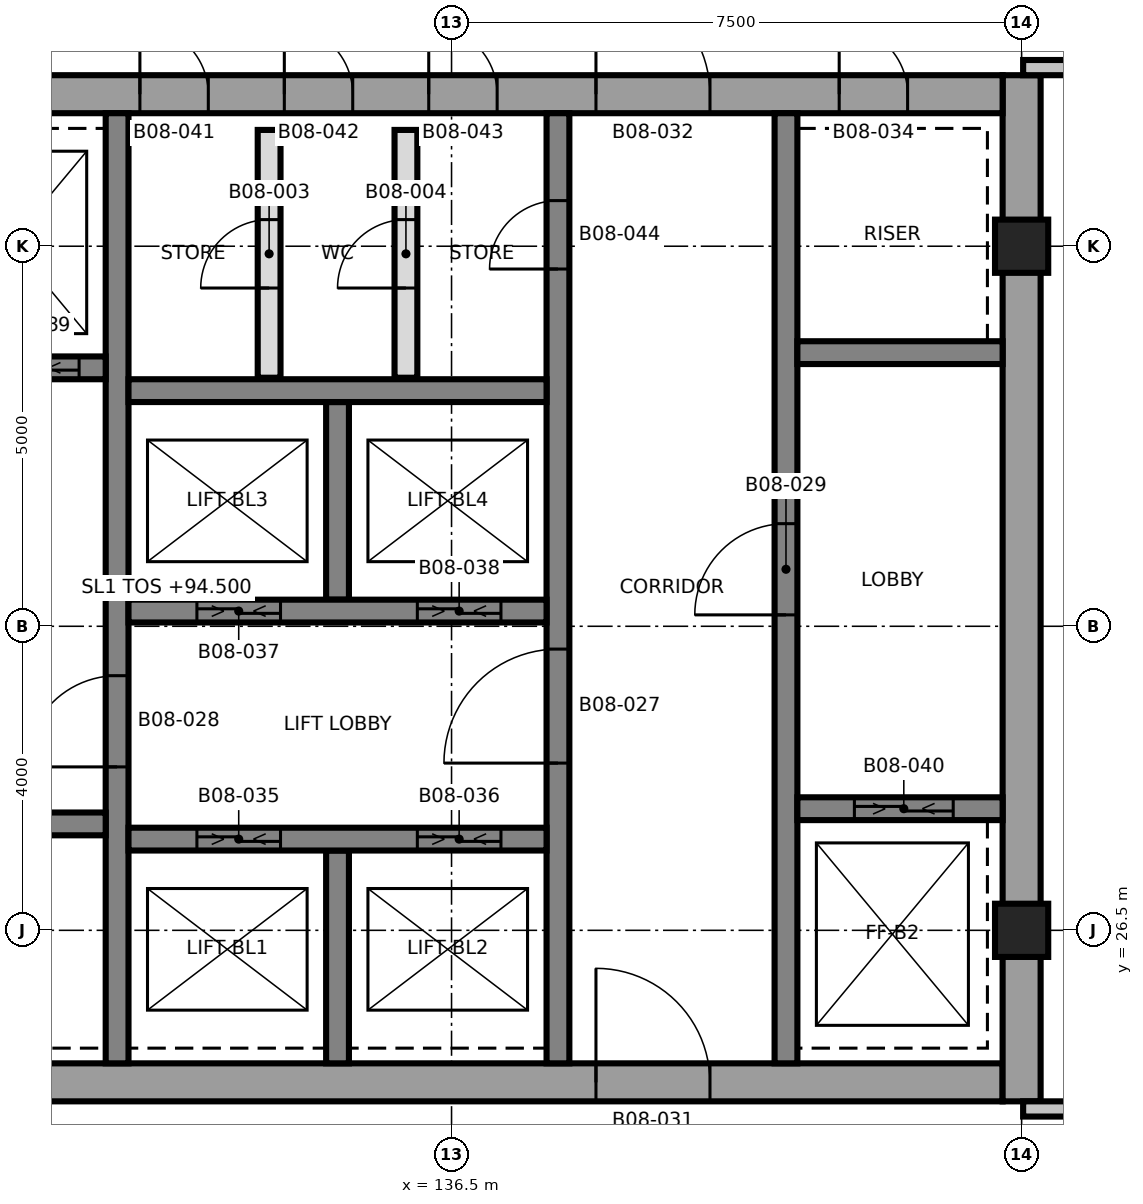
"""IFC4 building model, lengths in metres.
Left out: names, types, materials, properties, quantities, classifications, styles, units other than length and angle.
Written with IfcOpenShell. Run it as: python <this file> out.ifc"""

import sys

from ifc_helpers import new_model, si_unit, direction, frame, frame_2d, origin, origin_2d, place, context, subcontext, project, spatial, rectangle, extrude, element, fill, save


model = new_model("IFC4")
c1 = context("Model", 3, precision=1e-05, world=origin(), true_north=direction((0.0, 1.0)))
c2 = subcontext(c1, "Body", "Model", "MODEL_VIEW")
j1 = project(units=[si_unit("LENGTHUNIT", "METRE"), si_unit("PLANEANGLEUNIT", "RADIAN")], contexts=[c1])
p1 = place(None, origin())
s1 = spatial("IfcSite", under=j1, at=p1, CompositionType="ELEMENT")
p2 = place(p1, origin())
s2 = spatial("IfcBuilding", under=s1, at=p2, CompositionType="ELEMENT")
p3 = place(p2, frame((0.0, 0.0, 94.5)))
s3 = spatial("IfcBuildingStorey", under=s2, at=p3, CompositionType="ELEMENT", Elevation=94.5)
p4 = place(p3, frame((128.75, 24.5, 0.0), z_axis=(0.0, 0.0, 1.0), x_axis=(1.0, 0.0, 0.0)))
e1 = element("IfcWall", 1, at=p4, inside=s3, PredefinedType="SHEAR", context=c2, shape_type="SweptSolid", body=[
    extrude(rectangle(XDim=15.0, YDim=0.5, at=frame_2d((7.5, 0.0))), origin(), (0.0, 0.0, 1.0), 3.7),
])
p5 = place(p4, frame((9.65, 0.0, 0.0)))
e2 = element("IfcOpeningElement", 2, at=p5, cuts=e1, PredefinedType="OPENING", context=c2, shape_type="SweptSolid", body=[
    extrude(rectangle(XDim=1.5, YDim=2.1, at=frame_2d((0.75, 1.05))), frame((0.0, 0.26, 0.0), z_axis=(0.0, -1.0, 0.0), x_axis=(1.0, 0.0, 0.0)), (0.0, 0.0, 1.0), 0.52),
])
p6 = place(p4, frame((1.25, 0.0, 0.0)))
e3 = element("IfcOpeningElement", 3, at=p6, cuts=e1, PredefinedType="OPENING", context=c2, shape_type="SweptSolid", body=[
    extrude(rectangle(XDim=0.9, YDim=2.1, at=frame_2d((0.45, 1.05))), frame((0.0, 0.26, 0.0), z_axis=(0.0, -1.0, 0.0), x_axis=(1.0, 0.0, 0.0)), (0.0, 0.0, 1.0), 0.52),
])
p7 = place(p3, frame((144.0, 24.25, 0.0), z_axis=(0.0, 0.0, 1.0), x_axis=(0.0, 1.0, 0.0)))
e4 = element("IfcWall", 4, at=p7, inside=s3, PredefinedType="SHEAR", context=c2, shape_type="SweptSolid", body=[
    extrude(rectangle(XDim=13.5, YDim=0.5, at=frame_2d((6.75, 0.0))), origin(), (0.0, 0.0, 1.0), 3.7),
])
p8 = place(p3, frame((128.75, 37.5, 0.0), z_axis=(0.0, 0.0, 1.0), x_axis=(1.0, 0.0, 0.0)))
e5 = element("IfcWall", 5, at=p8, inside=s3, PredefinedType="SHEAR", context=c2, shape_type="SweptSolid", body=[
    extrude(rectangle(XDim=15.0, YDim=0.5, at=frame_2d((7.5, 0.0))), origin(), (0.0, 0.0, 1.0), 3.7),
])
p9 = place(p8, frame((9.65, 0.0, 0.0)))
e6 = element("IfcOpeningElement", 6, at=p9, cuts=e5, PredefinedType="OPENING", context=c2, shape_type="SweptSolid", body=[
    extrude(rectangle(XDim=1.5, YDim=2.1, at=frame_2d((0.75, 1.05))), frame((0.0, 0.26, 0.0), z_axis=(0.0, -1.0, 0.0), x_axis=(1.0, 0.0, 0.0)), (0.0, 0.0, 1.0), 0.52),
])
p10 = place(p8, frame((12.85, 0.0, 0.0)))
e7 = element("IfcOpeningElement", 7, at=p10, cuts=e5, PredefinedType="OPENING", context=c2, shape_type="SweptSolid", body=[
    extrude(rectangle(XDim=0.9, YDim=2.1, at=frame_2d((0.45, 1.05))), frame((0.0, 0.26, 0.0), z_axis=(0.0, -1.0, 0.0), x_axis=(1.0, 0.0, 0.0)), (0.0, 0.0, 1.0), 0.52),
])
p11 = place(p8, frame((3.65, 0.0, 0.0)))
e8 = element("IfcOpeningElement", 8, at=p11, cuts=e5, PredefinedType="OPENING", context=c2, shape_type="SweptSolid", body=[
    extrude(rectangle(XDim=0.9, YDim=2.1, at=frame_2d((0.45, 1.05))), frame((0.0, 0.26, 0.0), z_axis=(0.0, -1.0, 0.0), x_axis=(1.0, 0.0, 0.0)), (0.0, 0.0, 1.0), 0.52),
])
p12 = place(p8, frame((5.55, 0.0, 0.0)))
e9 = element("IfcOpeningElement", 9, at=p12, cuts=e5, PredefinedType="OPENING", context=c2, shape_type="SweptSolid", body=[
    extrude(rectangle(XDim=0.9, YDim=2.1, at=frame_2d((0.45, 1.05))), frame((0.0, 0.26, 0.0), z_axis=(0.0, -1.0, 0.0), x_axis=(1.0, 0.0, 0.0)), (0.0, 0.0, 1.0), 0.52),
])
p13 = place(p8, frame((7.45, 0.0, 0.0)))
e10 = element("IfcOpeningElement", 10, at=p13, cuts=e5, PredefinedType="OPENING", context=c2, shape_type="SweptSolid", body=[
    extrude(rectangle(XDim=0.9, YDim=2.1, at=frame_2d((0.45, 1.05))), frame((0.0, 0.26, 0.0), z_axis=(0.0, -1.0, 0.0), x_axis=(1.0, 0.0, 0.0)), (0.0, 0.0, 1.0), 0.52),
])
p14 = place(p3, frame((132.1, 24.75, 0.0), z_axis=(0.0, 0.0, 1.0), x_axis=(0.0, 1.0, 0.0)))
e11 = element("IfcWall", 11, at=p14, inside=s3, PredefinedType="SHEAR", context=c2, shape_type="SweptSolid", body=[
    extrude(rectangle(XDim=12.5, YDim=0.3, at=frame_2d((6.25, 0.0))), origin(), (0.0, 0.0, 1.0), 3.7),
])
p15 = place(p14, frame((3.9, 0.0, 0.0)))
e12 = element("IfcOpeningElement", 12, at=p15, cuts=e11, PredefinedType="OPENING", context=c2, shape_type="SweptSolid", body=[
    extrude(rectangle(XDim=1.2, YDim=2.1, at=frame_2d((0.6, 1.05))), frame((0.0, 0.16, 0.0), z_axis=(0.0, -1.0, 0.0), x_axis=(1.0, 0.0, 0.0)), (0.0, 0.0, 1.0), 0.32),
])
p16 = place(p3, frame((137.9, 24.75, 0.0), z_axis=(0.0, 0.0, 1.0), x_axis=(0.0, 1.0, 0.0)))
e13 = element("IfcWall", 13, at=p16, inside=s3, PredefinedType="SHEAR", context=c2, shape_type="SweptSolid", body=[
    extrude(rectangle(XDim=12.5, YDim=0.3, at=frame_2d((6.25, 0.0))), origin(), (0.0, 0.0, 1.0), 3.7),
])
p17 = place(p16, frame((3.95, 0.0, 0.0)))
e14 = element("IfcOpeningElement", 14, at=p17, cuts=e13, PredefinedType="OPENING", context=c2, shape_type="SweptSolid", body=[
    extrude(rectangle(XDim=1.5, YDim=2.1, at=frame_2d((0.75, 1.05))), frame((0.0, 0.16, 0.0), z_axis=(0.0, -1.0, 0.0), x_axis=(1.0, 0.0, 0.0)), (0.0, 0.0, 1.0), 0.32),
])
p18 = place(p16, frame((10.45, 0.0, 0.0)))
e15 = element("IfcOpeningElement", 15, at=p18, cuts=e13, PredefinedType="OPENING", context=c2, shape_type="SweptSolid", body=[
    extrude(rectangle(XDim=0.9, YDim=2.1, at=frame_2d((0.45, 1.05))), frame((0.0, 0.16, 0.0), z_axis=(0.0, -1.0, 0.0), x_axis=(1.0, 0.0, 0.0)), (0.0, 0.0, 1.0), 0.32),
])
p19 = place(p3, frame((140.9, 24.75, 0.0), z_axis=(0.0, 0.0, 1.0), x_axis=(0.0, 1.0, 0.0)))
e16 = element("IfcWall", 16, at=p19, inside=s3, PredefinedType="SHEAR", context=c2, shape_type="SweptSolid", body=[
    extrude(rectangle(XDim=12.5, YDim=0.3, at=frame_2d((6.25, 0.0))), origin(), (0.0, 0.0, 1.0), 3.7),
])
p20 = place(p19, frame((5.9, 0.0, 0.0)))
e17 = element("IfcOpeningElement", 17, at=p20, cuts=e16, PredefinedType="OPENING", context=c2, shape_type="SweptSolid", body=[
    extrude(rectangle(XDim=1.2, YDim=2.1, at=frame_2d((0.6, 1.05))), frame((0.0, 0.16, 0.0), z_axis=(0.0, -1.0, 0.0), x_axis=(1.0, 0.0, 0.0)), (0.0, 0.0, 1.0), 0.32),
])
p21 = place(p3, frame((135.0, 24.75, 0.0), z_axis=(0.0, 0.0, 1.0), x_axis=(0.0, 1.0, 0.0)))
e18 = element("IfcWall", 18, at=p21, inside=s3, PredefinedType="SHEAR", context=c2, shape_type="SweptSolid", body=[
    extrude(rectangle(XDim=2.8, YDim=0.3, at=frame_2d((1.4, 0.0))), origin(), (0.0, 0.0, 1.0), 3.7),
])
p22 = place(p3, frame((135.0, 30.85, 0.0), z_axis=(0.0, 0.0, 1.0), x_axis=(0.0, 1.0, 0.0)))
e19 = element("IfcWall", 19, at=p22, inside=s3, PredefinedType="SHEAR", context=c2, shape_type="SweptSolid", body=[
    extrude(rectangle(XDim=2.6, YDim=0.3, at=frame_2d((1.3, 0.0))), origin(), (0.0, 0.0, 1.0), 3.7),
])
p23 = place(p3, frame((132.25, 27.7, 0.0), z_axis=(0.0, 0.0, 1.0), x_axis=(1.0, 0.0, 0.0)))
e20 = element("IfcWall", 20, at=p23, inside=s3, PredefinedType="SHEAR", context=c2, shape_type="SweptSolid", body=[
    extrude(rectangle(XDim=5.5, YDim=0.3, at=frame_2d((2.75, 0.0))), origin(), (0.0, 0.0, 1.0), 3.7),
])
p24 = place(p23, frame((0.9, 0.0, 0.0)))
e21 = element("IfcOpeningElement", 21, at=p24, cuts=e20, PredefinedType="OPENING", context=c2, shape_type="SweptSolid", body=[
    extrude(rectangle(XDim=1.1, YDim=2.4, at=frame_2d((0.55, 1.2))), frame((0.0, 0.16, 0.0), z_axis=(0.0, -1.0, 0.0), x_axis=(1.0, 0.0, 0.0)), (0.0, 0.0, 1.0), 0.32),
])
p25 = place(p23, frame((3.8, 0.0, 0.0)))
e22 = element("IfcOpeningElement", 22, at=p25, cuts=e20, PredefinedType="OPENING", context=c2, shape_type="SweptSolid", body=[
    extrude(rectangle(XDim=1.1, YDim=2.4, at=frame_2d((0.55, 1.2))), frame((0.0, 0.16, 0.0), z_axis=(0.0, -1.0, 0.0), x_axis=(1.0, 0.0, 0.0)), (0.0, 0.0, 1.0), 0.32),
])
p26 = place(p3, frame((132.25, 30.7, 0.0), z_axis=(0.0, 0.0, 1.0), x_axis=(1.0, 0.0, 0.0)))
e23 = element("IfcWall", 23, at=p26, inside=s3, PredefinedType="SHEAR", context=c2, shape_type="SweptSolid", body=[
    extrude(rectangle(XDim=5.5, YDim=0.3, at=frame_2d((2.75, 0.0))), origin(), (0.0, 0.0, 1.0), 3.7),
])
p27 = place(p26, frame((0.9, 0.0, 0.0)))
e24 = element("IfcOpeningElement", 24, at=p27, cuts=e23, PredefinedType="OPENING", context=c2, shape_type="SweptSolid", body=[
    extrude(rectangle(XDim=1.1, YDim=2.4, at=frame_2d((0.55, 1.2))), frame((0.0, 0.16, 0.0), z_axis=(0.0, -1.0, 0.0), x_axis=(1.0, 0.0, 0.0)), (0.0, 0.0, 1.0), 0.32),
])
p28 = place(p26, frame((3.8, 0.0, 0.0)))
e25 = element("IfcOpeningElement", 25, at=p28, cuts=e23, PredefinedType="OPENING", context=c2, shape_type="SweptSolid", body=[
    extrude(rectangle(XDim=1.1, YDim=2.4, at=frame_2d((0.55, 1.2))), frame((0.0, 0.16, 0.0), z_axis=(0.0, -1.0, 0.0), x_axis=(1.0, 0.0, 0.0)), (0.0, 0.0, 1.0), 0.32),
])
p29 = place(p3, frame((132.25, 33.6, 0.0), z_axis=(0.0, 0.0, 1.0), x_axis=(1.0, 0.0, 0.0)))
e26 = element("IfcWall", 26, at=p29, inside=s3, PredefinedType="SHEAR", context=c2, shape_type="SweptSolid", body=[
    extrude(rectangle(XDim=5.5, YDim=0.3, at=frame_2d((2.75, 0.0))), origin(), (0.0, 0.0, 1.0), 3.7),
])
p30 = place(p3, frame((129.25, 27.9, 0.0), z_axis=(0.0, 0.0, 1.0), x_axis=(1.0, 0.0, 0.0)))
e27 = element("IfcWall", 27, at=p30, inside=s3, PredefinedType="SHEAR", context=c2, shape_type="SweptSolid", body=[
    extrude(rectangle(XDim=2.7, YDim=0.3, at=frame_2d((1.35, 0.0))), origin(), (0.0, 0.0, 1.0), 3.7),
])
p31 = place(p3, frame((129.25, 33.9, 0.0), z_axis=(0.0, 0.0, 1.0), x_axis=(1.0, 0.0, 0.0)))
e28 = element("IfcWall", 28, at=p31, inside=s3, PredefinedType="SHEAR", context=c2, shape_type="SweptSolid", body=[
    extrude(rectangle(XDim=2.7, YDim=0.3, at=frame_2d((1.35, 0.0))), origin(), (0.0, 0.0, 1.0), 3.7),
])
p32 = place(p31, frame((1.05, 0.0, 0.0)))
e29 = element("IfcOpeningElement", 29, at=p32, cuts=e28, PredefinedType="OPENING", context=c2, shape_type="SweptSolid", body=[
    extrude(rectangle(XDim=1.3, YDim=2.4, at=frame_2d((0.65, 1.2))), frame((0.0, 0.16, 0.0), z_axis=(0.0, -1.0, 0.0), x_axis=(1.0, 0.0, 0.0)), (0.0, 0.0, 1.0), 0.32),
])
p33 = place(p3, frame((141.05, 28.1, 0.0), z_axis=(0.0, 0.0, 1.0), x_axis=(1.0, 0.0, 0.0)))
e30 = element("IfcWall", 30, at=p33, inside=s3, PredefinedType="SHEAR", context=c2, shape_type="SweptSolid", body=[
    extrude(rectangle(XDim=2.7, YDim=0.3, at=frame_2d((1.35, 0.0))), origin(), (0.0, 0.0, 1.0), 3.7),
])
p34 = place(p33, frame((0.75, 0.0, 0.0)))
e31 = element("IfcOpeningElement", 31, at=p34, cuts=e30, PredefinedType="OPENING", context=c2, shape_type="SweptSolid", body=[
    extrude(rectangle(XDim=1.3, YDim=2.4, at=frame_2d((0.65, 1.2))), frame((0.0, 0.16, 0.0), z_axis=(0.0, -1.0, 0.0), x_axis=(1.0, 0.0, 0.0)), (0.0, 0.0, 1.0), 0.32),
])
p35 = place(p3, frame((141.05, 34.1, 0.0), z_axis=(0.0, 0.0, 1.0), x_axis=(1.0, 0.0, 0.0)))
e32 = element("IfcWall", 32, at=p35, inside=s3, PredefinedType="SHEAR", context=c2, shape_type="SweptSolid", body=[
    extrude(rectangle(XDim=2.7, YDim=0.3, at=frame_2d((1.35, 0.0))), origin(), (0.0, 0.0, 1.0), 3.7),
])
for number, where, z_axis, x_axis in (
    (33, (144.0, 26.5, 0.0), (0.0, 0.0, 1.0), (1.0, 0.0, 0.0)),
    (34, (144.0, 35.5, 0.0), (0.0, 0.0, 1.0), (1.0, 0.0, 0.0)),
):
    element("IfcColumn", number, at=place(p3, frame(where, z_axis=z_axis, x_axis=x_axis)), inside=s3, PredefinedType="COLUMN", context=c2, shape_type="SweptSolid", body=[
        extrude(rectangle(XDim=0.7, YDim=0.7, at=origin_2d()), origin(), (0.0, 0.0, 1.0), 3.7),
    ])
for number, where, z_axis, x_axis in (
    (35, (144.02, 24.15, 0.0), (0.0, 0.0, 1.0), (1.0, 0.0, 0.0)),
    (36, (144.02, 37.85, 0.0), (0.0, 0.0, 1.0), (1.0, 0.0, 0.0)),
):
    element("IfcWall", number, at=place(p3, frame(where, z_axis=z_axis, x_axis=x_axis)), inside=s3, PredefinedType="PARTITIONING", context=c2, shape_type="SweptSolid", body=[
        extrude(rectangle(XDim=0.92, YDim=0.2, at=frame_2d((0.46, 0.0))), origin(), (0.0, 0.0, 1.0), 3.4),
    ])
p36 = place(p3, frame((134.1, 33.77, 0.0), z_axis=(0.0, 0.0, 1.0), x_axis=(0.0, 1.0, 0.0)))
e37 = element("IfcWall", 37, at=p36, inside=s3, PredefinedType="PARTITIONING", context=c2, shape_type="SweptSolid", body=[
    extrude(rectangle(XDim=3.26, YDim=0.3, at=frame_2d((1.63, 0.0))), origin(), (0.0, 0.0, 1.0), 3.4),
])
p37 = place(p36, frame((1.18, 0.0, 0.0)))
e38 = element("IfcOpeningElement", 38, at=p37, cuts=e37, PredefinedType="OPENING", context=c2, shape_type="SweptSolid", body=[
    extrude(rectangle(XDim=0.9, YDim=2.1, at=frame_2d((0.45, 1.05))), frame((0.0, 0.16, 0.0), z_axis=(0.0, -1.0, 0.0), x_axis=(1.0, 0.0, 0.0)), (0.0, 0.0, 1.0), 0.32),
])
p38 = place(p3, frame((135.9, 33.77, 0.0), z_axis=(0.0, 0.0, 1.0), x_axis=(0.0, 1.0, 0.0)))
e39 = element("IfcWall", 39, at=p38, inside=s3, PredefinedType="PARTITIONING", context=c2, shape_type="SweptSolid", body=[
    extrude(rectangle(XDim=3.26, YDim=0.3, at=frame_2d((1.63, 0.0))), origin(), (0.0, 0.0, 1.0), 3.4),
])
p39 = place(p38, frame((1.18, 0.0, 0.0)))
e40 = element("IfcOpeningElement", 40, at=p39, cuts=e39, PredefinedType="OPENING", context=c2, shape_type="SweptSolid", body=[
    extrude(rectangle(XDim=0.9, YDim=2.1, at=frame_2d((0.45, 1.05))), frame((0.0, 0.16, 0.0), z_axis=(0.0, -1.0, 0.0), x_axis=(1.0, 0.0, 0.0)), (0.0, 0.0, 1.0), 0.32),
])
p40 = place(p37, origin())
e41 = element("IfcDoor", 41, at=p40, inside=s3, OperationType="SINGLE_SWING_LEFT", PredefinedType="DOOR", context=c2, shape_type="SweptSolid", body=[
    extrude(rectangle(XDim=0.9, YDim=2.1, at=frame_2d((0.45, 1.05))), frame((0.0, 0.025, 0.0), z_axis=(0.0, -1.0, 0.0), x_axis=(1.0, 0.0, 0.0)), (0.0, 0.0, 1.0), 0.05),
])
fill(e38, e41)
p41 = place(p39, origin())
e42 = element("IfcDoor", 42, at=p41, inside=s3, OperationType="SINGLE_SWING_RIGHT", PredefinedType="DOOR", context=c2, shape_type="SweptSolid", body=[
    extrude(rectangle(XDim=0.9, YDim=2.1, at=frame_2d((0.45, 1.05))), frame((0.0, 0.025, 0.0), z_axis=(0.0, -1.0, 0.0), x_axis=(1.0, 0.0, 0.0)), (0.0, 0.0, 1.0), 0.05),
])
fill(e40, e42)
p42 = place(p17, origin())
e43 = element("IfcDoor", 43, at=p42, inside=s3, OperationType="SINGLE_SWING_RIGHT", PredefinedType="DOOR", context=c2, shape_type="SweptSolid", body=[
    extrude(rectangle(XDim=1.5, YDim=2.1, at=frame_2d((0.75, 1.05))), frame((0.0, 0.025, 0.0), z_axis=(0.0, -1.0, 0.0), x_axis=(1.0, 0.0, 0.0)), (0.0, 0.0, 1.0), 0.05),
])
fill(e14, e43)
p43 = place(p15, origin())
e44 = element("IfcDoor", 44, at=p43, inside=s3, OperationType="SINGLE_SWING_LEFT", PredefinedType="DOOR", context=c2, shape_type="SweptSolid", body=[
    extrude(rectangle(XDim=1.2, YDim=2.1, at=frame_2d((0.6, 1.05))), frame((0.0, 0.025, 0.0), z_axis=(0.0, -1.0, 0.0), x_axis=(1.0, 0.0, 0.0)), (0.0, 0.0, 1.0), 0.05),
])
fill(e12, e44)
p44 = place(p20, origin())
e45 = element("IfcDoor", 45, at=p44, inside=s3, OperationType="SINGLE_SWING_RIGHT", PredefinedType="DOOR", context=c2, shape_type="SweptSolid", body=[
    extrude(rectangle(XDim=1.2, YDim=2.1, at=frame_2d((0.6, 1.05))), frame((0.0, 0.025, 0.0), z_axis=(0.0, -1.0, 0.0), x_axis=(1.0, 0.0, 0.0)), (0.0, 0.0, 1.0), 0.05),
])
fill(e17, e45)
p45 = place(p5, origin())
e46 = element("IfcDoor", 46, at=p45, inside=s3, OperationType="SINGLE_SWING_LEFT", PredefinedType="DOOR", context=c2, shape_type="SweptSolid", body=[
    extrude(rectangle(XDim=1.5, YDim=2.1, at=frame_2d((0.75, 1.05))), frame((0.0, 0.025, 0.0), z_axis=(0.0, -1.0, 0.0), x_axis=(1.0, 0.0, 0.0)), (0.0, 0.0, 1.0), 0.05),
])
fill(e2, e46)
p46 = place(p9, origin())
e47 = element("IfcDoor", 47, at=p46, inside=s3, OperationType="SINGLE_SWING_RIGHT", PredefinedType="DOOR", context=c2, shape_type="SweptSolid", body=[
    extrude(rectangle(XDim=1.5, YDim=2.1, at=frame_2d((0.75, 1.05))), frame((0.0, 0.025, 0.0), z_axis=(0.0, -1.0, 0.0), x_axis=(1.0, 0.0, 0.0)), (0.0, 0.0, 1.0), 0.05),
])
fill(e6, e47)
p47 = place(p10, origin())
e48 = element("IfcDoor", 48, at=p47, inside=s3, OperationType="SINGLE_SWING_RIGHT", PredefinedType="DOOR", context=c2, shape_type="SweptSolid", body=[
    extrude(rectangle(XDim=0.9, YDim=2.1, at=frame_2d((0.45, 1.05))), frame((0.0, 0.025, 0.0), z_axis=(0.0, -1.0, 0.0), x_axis=(1.0, 0.0, 0.0)), (0.0, 0.0, 1.0), 0.05),
])
fill(e7, e48)
p48 = place(p24, origin())
e49 = element("IfcDoor", 49, at=p48, inside=s3, OperationType="SLIDING_TO_LEFT", PredefinedType="DOOR", context=c2, shape_type="SweptSolid", body=[
    extrude(rectangle(XDim=1.1, YDim=2.4, at=frame_2d((0.55, 1.2))), frame((0.0, 0.025, 0.0), z_axis=(0.0, -1.0, 0.0), x_axis=(1.0, 0.0, 0.0)), (0.0, 0.0, 1.0), 0.05),
])
fill(e21, e49)
p49 = place(p25, origin())
e50 = element("IfcDoor", 50, at=p49, inside=s3, OperationType="SLIDING_TO_LEFT", PredefinedType="DOOR", context=c2, shape_type="SweptSolid", body=[
    extrude(rectangle(XDim=1.1, YDim=2.4, at=frame_2d((0.55, 1.2))), frame((0.0, 0.025, 0.0), z_axis=(0.0, -1.0, 0.0), x_axis=(1.0, 0.0, 0.0)), (0.0, 0.0, 1.0), 0.05),
])
fill(e22, e50)
p50 = place(p27, origin())
e51 = element("IfcDoor", 51, at=p50, inside=s3, OperationType="SLIDING_TO_LEFT", PredefinedType="DOOR", context=c2, shape_type="SweptSolid", body=[
    extrude(rectangle(XDim=1.1, YDim=2.4, at=frame_2d((0.55, 1.2))), frame((0.0, 0.025, 0.0), z_axis=(0.0, -1.0, 0.0), x_axis=(1.0, 0.0, 0.0)), (0.0, 0.0, 1.0), 0.05),
])
fill(e24, e51)
p51 = place(p28, origin())
e52 = element("IfcDoor", 52, at=p51, inside=s3, OperationType="SLIDING_TO_LEFT", PredefinedType="DOOR", context=c2, shape_type="SweptSolid", body=[
    extrude(rectangle(XDim=1.1, YDim=2.4, at=frame_2d((0.55, 1.2))), frame((0.0, 0.025, 0.0), z_axis=(0.0, -1.0, 0.0), x_axis=(1.0, 0.0, 0.0)), (0.0, 0.0, 1.0), 0.05),
])
fill(e25, e52)
p52 = place(p32, origin())
e53 = element("IfcDoor", 53, at=p52, inside=s3, OperationType="SLIDING_TO_LEFT", PredefinedType="DOOR", context=c2, shape_type="SweptSolid", body=[
    extrude(rectangle(XDim=1.3, YDim=2.4, at=frame_2d((0.65, 1.2))), frame((0.0, 0.025, 0.0), z_axis=(0.0, -1.0, 0.0), x_axis=(1.0, 0.0, 0.0)), (0.0, 0.0, 1.0), 0.05),
])
fill(e29, e53)
p53 = place(p34, origin())
e54 = element("IfcDoor", 54, at=p53, inside=s3, OperationType="SLIDING_TO_LEFT", PredefinedType="DOOR", context=c2, shape_type="SweptSolid", body=[
    extrude(rectangle(XDim=1.3, YDim=2.4, at=frame_2d((0.65, 1.2))), frame((0.0, 0.025, 0.0), z_axis=(0.0, -1.0, 0.0), x_axis=(1.0, 0.0, 0.0)), (0.0, 0.0, 1.0), 0.05),
])
fill(e31, e54)
p54 = place(p11, origin())
e55 = element("IfcDoor", 55, at=p54, inside=s3, OperationType="SINGLE_SWING_LEFT", PredefinedType="DOOR", context=c2, shape_type="SweptSolid", body=[
    extrude(rectangle(XDim=0.9, YDim=2.1, at=frame_2d((0.45, 1.05))), frame((0.0, 0.025, 0.0), z_axis=(0.0, -1.0, 0.0), x_axis=(1.0, 0.0, 0.0)), (0.0, 0.0, 1.0), 0.05),
])
fill(e8, e55)
p55 = place(p12, origin())
e56 = element("IfcDoor", 56, at=p55, inside=s3, OperationType="SINGLE_SWING_RIGHT", PredefinedType="DOOR", context=c2, shape_type="SweptSolid", body=[
    extrude(rectangle(XDim=0.9, YDim=2.1, at=frame_2d((0.45, 1.05))), frame((0.0, 0.025, 0.0), z_axis=(0.0, -1.0, 0.0), x_axis=(1.0, 0.0, 0.0)), (0.0, 0.0, 1.0), 0.05),
])
fill(e9, e56)
p56 = place(p13, origin())
e57 = element("IfcDoor", 57, at=p56, inside=s3, OperationType="SINGLE_SWING_LEFT", PredefinedType="DOOR", context=c2, shape_type="SweptSolid", body=[
    extrude(rectangle(XDim=0.9, YDim=2.1, at=frame_2d((0.45, 1.05))), frame((0.0, 0.025, 0.0), z_axis=(0.0, -1.0, 0.0), x_axis=(1.0, 0.0, 0.0)), (0.0, 0.0, 1.0), 0.05),
])
fill(e10, e57)
p57 = place(p18, origin())
e58 = element("IfcDoor", 58, at=p57, inside=s3, OperationType="SINGLE_SWING_RIGHT", PredefinedType="DOOR", context=c2, shape_type="SweptSolid", body=[
    extrude(rectangle(XDim=0.9, YDim=2.1, at=frame_2d((0.45, 1.05))), frame((0.0, 0.025, 0.0), z_axis=(0.0, -1.0, 0.0), x_axis=(1.0, 0.0, 0.0)), (0.0, 0.0, 1.0), 0.05),
])
fill(e15, e58)
save(model, sys.argv[1])
